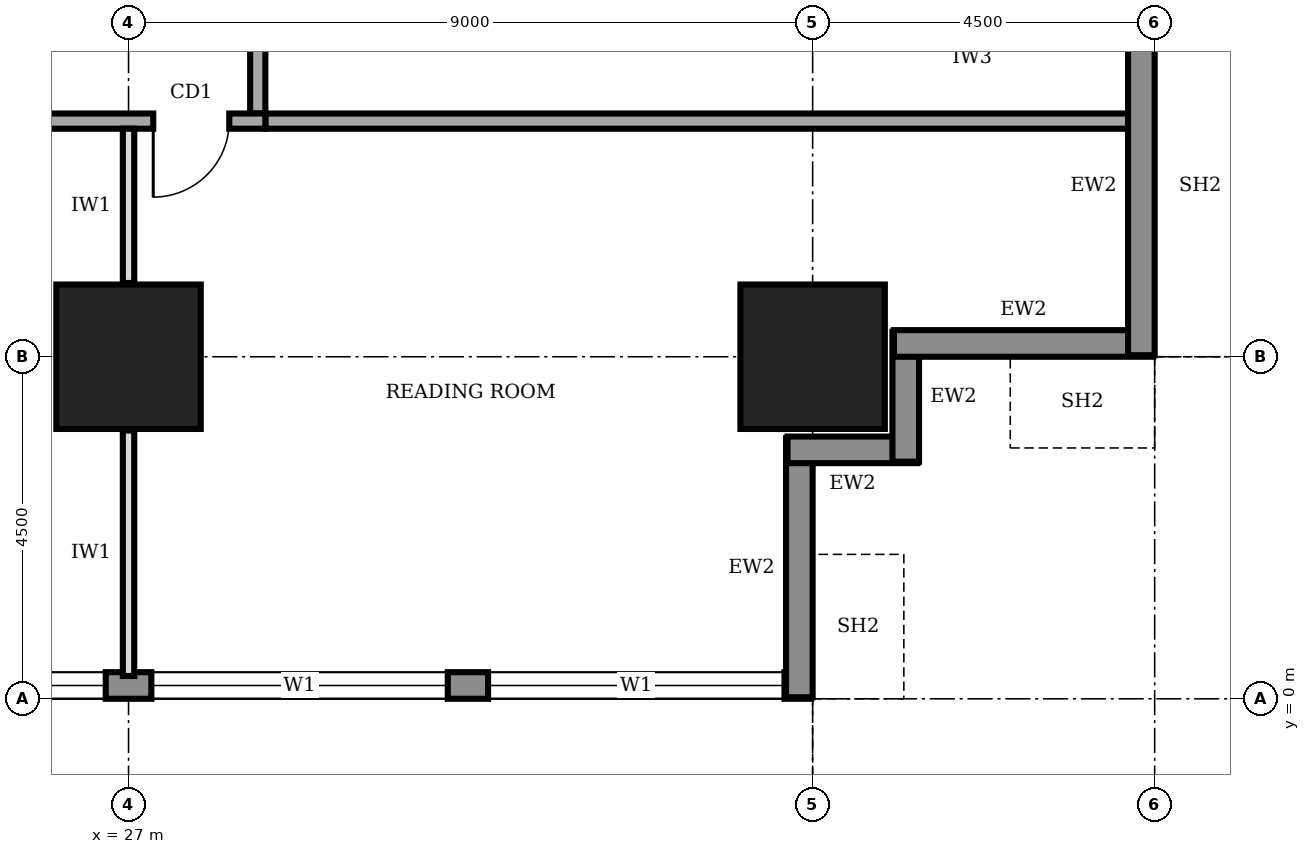
"""IFC4 building model, lengths in metres.
Left out: names, types, materials, properties, quantities, classifications, styles, units other than length and angle.
Written with IfcOpenShell. Run it as: python <this file> out.ifc"""

import sys

from ifc_helpers import new_model, si_unit, direction, frame, frame_2d, origin, origin_2d, place, context, subcontext, project, spatial, rectangle, extrude, element, fill, save


model = new_model("IFC4")
c1 = context("Model", 3, precision=1e-05, world=origin(), true_north=direction((0.0, 1.0)))
c2 = subcontext(c1, "Body", "Model", "MODEL_VIEW")
j1 = project(units=[si_unit("LENGTHUNIT", "METRE"), si_unit("PLANEANGLEUNIT", "RADIAN")], contexts=[c1])
p1 = place(None, origin())
s1 = spatial("IfcSite", under=j1, at=p1, CompositionType="ELEMENT")
p2 = place(p1, origin())
s2 = spatial("IfcBuilding", under=s1, at=p2, CompositionType="ELEMENT")
p3 = place(p2, frame((0.0, 0.0, 129.0)))
s3 = spatial("IfcBuildingStorey", under=s2, at=p3, CompositionType="ELEMENT", Elevation=129.0)
for number, where, z_axis, x_axis in (
    (1, (27.0, 4.5, 0.0), (0.0, 0.0, 1.0), (1.0, 0.0, 0.0)),
    (2, (36.0, 4.5, 0.0), (0.0, 0.0, 1.0), (1.0, 0.0, 0.0)),
):
    element("IfcColumn", number, at=place(p3, frame(where, z_axis=z_axis, x_axis=x_axis)), inside=s3, PredefinedType="COLUMN", context=c2, shape_type="SweptSolid", body=[
        extrude(rectangle(XDim=1.9, YDim=1.9, at=origin_2d()), origin(), (0.0, 0.0, 1.0), 4.0),
    ])
p4 = place(p3, frame((4.52, 0.175, 0.0), z_axis=(0.0, 0.0, 1.0), x_axis=(1.0, 0.0, 0.0)))
e3 = element("IfcWall", 3, at=p4, inside=s3, PredefinedType="STANDARD", context=c2, shape_type="SweptSolid", body=[
    extrude(rectangle(XDim=31.46, YDim=0.35, at=frame_2d((15.73, 0.0))), origin(), (0.0, 0.0, 1.0), 3.75),
])
p5 = place(p4, frame((4.78, 0.0, 0.9)))
e4 = element("IfcOpeningElement", 4, at=p5, cuts=e3, PredefinedType="OPENING", context=c2, shape_type="SweptSolid", body=[
    extrude(rectangle(XDim=3.9, YDim=2.2, at=frame_2d((1.95, 1.1))), frame((0.0, 0.185, 0.0), z_axis=(0.0, -1.0, 0.0), x_axis=(1.0, 0.0, 0.0)), (0.0, 0.0, 1.0), 0.37),
])
p6 = place(p4, frame((9.28, 0.0, 0.9)))
e5 = element("IfcOpeningElement", 5, at=p6, cuts=e3, PredefinedType="OPENING", context=c2, shape_type="SweptSolid", body=[
    extrude(rectangle(XDim=3.9, YDim=2.2, at=frame_2d((1.95, 1.1))), frame((0.0, 0.185, 0.0), z_axis=(0.0, -1.0, 0.0), x_axis=(1.0, 0.0, 0.0)), (0.0, 0.0, 1.0), 0.37),
])
p7 = place(p4, frame((13.78, 0.0, 0.9)))
e6 = element("IfcOpeningElement", 6, at=p7, cuts=e3, PredefinedType="OPENING", context=c2, shape_type="SweptSolid", body=[
    extrude(rectangle(XDim=3.9, YDim=2.2, at=frame_2d((1.95, 1.1))), frame((0.0, 0.185, 0.0), z_axis=(0.0, -1.0, 0.0), x_axis=(1.0, 0.0, 0.0)), (0.0, 0.0, 1.0), 0.37),
])
p8 = place(p4, frame((18.28, 0.0, 0.9)))
e7 = element("IfcOpeningElement", 7, at=p8, cuts=e3, PredefinedType="OPENING", context=c2, shape_type="SweptSolid", body=[
    extrude(rectangle(XDim=3.9, YDim=2.2, at=frame_2d((1.95, 1.1))), frame((0.0, 0.185, 0.0), z_axis=(0.0, -1.0, 0.0), x_axis=(1.0, 0.0, 0.0)), (0.0, 0.0, 1.0), 0.37),
])
p9 = place(p4, frame((22.78, 0.0, 0.9)))
e8 = element("IfcOpeningElement", 8, at=p9, cuts=e3, PredefinedType="OPENING", context=c2, shape_type="SweptSolid", body=[
    extrude(rectangle(XDim=3.9, YDim=2.2, at=frame_2d((1.95, 1.1))), frame((0.0, 0.185, 0.0), z_axis=(0.0, -1.0, 0.0), x_axis=(1.0, 0.0, 0.0)), (0.0, 0.0, 1.0), 0.37),
])
p10 = place(p4, frame((27.21, 0.0, 0.9)))
e9 = element("IfcOpeningElement", 9, at=p10, cuts=e3, PredefinedType="OPENING", context=c2, shape_type="SweptSolid", body=[
    extrude(rectangle(XDim=3.9, YDim=2.2, at=frame_2d((1.95, 1.1))), frame((0.0, 0.185, 0.0), z_axis=(0.0, -1.0, 0.0), x_axis=(1.0, 0.0, 0.0)), (0.0, 0.0, 1.0), 0.37),
])
p11 = place(p3, frame((35.825, 0.02, 0.0), z_axis=(0.0, 0.0, 1.0), x_axis=(0.0, 1.0, 0.0)))
e10 = element("IfcWall", 10, at=p11, inside=s3, PredefinedType="STANDARD", context=c2, shape_type="SweptSolid", body=[
    extrude(rectangle(XDim=3.41, YDim=0.35, at=frame_2d((1.705, 0.0))), origin(), (0.0, 0.0, 1.0), 2.85),
])
for number, where, z_axis, x_axis in (
    (11, (35.67, 3.275, 0.0), (0.0, 0.0, 1.0), (1.0, 0.0, 0.0)),
    (12, (37.225, 3.12, 0.0), (0.0, 0.0, 1.0), (0.0, 1.0, 0.0)),
):
    element("IfcWall", number, at=place(p3, frame(where, z_axis=z_axis, x_axis=x_axis)), inside=s3, PredefinedType="STANDARD", context=c2, shape_type="SweptSolid", body=[
        extrude(rectangle(XDim=1.71, YDim=0.35, at=frame_2d((0.855, 0.0))), origin(), (0.0, 0.0, 1.0), 3.75),
    ])
p12 = place(p3, frame((37.07, 4.675, 0.0), z_axis=(0.0, 0.0, 1.0), x_axis=(1.0, 0.0, 0.0)))
e13 = element("IfcWall", 13, at=p12, inside=s3, PredefinedType="STANDARD", context=c2, shape_type="SweptSolid", body=[
    extrude(rectangle(XDim=3.41, YDim=0.35, at=frame_2d((1.705, 0.0))), origin(), (0.0, 0.0, 1.0), 2.85),
])
p13 = place(p3, frame((40.325, 4.52, 0.0), z_axis=(0.0, 0.0, 1.0), x_axis=(0.0, 1.0, 0.0)))
e14 = element("IfcWall", 14, at=p13, inside=s3, PredefinedType="STANDARD", context=c2, shape_type="SweptSolid", body=[
    extrude(rectangle(XDim=4.46, YDim=0.35, at=frame_2d((2.23, 0.0))), origin(), (0.0, 0.0, 1.0), 3.75),
])
p14 = place(p3, frame((11.9, 7.6, 0.0), z_axis=(0.0, 0.0, 1.0), x_axis=(1.0, 0.0, 0.0)))
e15 = element("IfcWall", 15, at=p14, inside=s3, PredefinedType="SOLIDWALL", context=c2, shape_type="SweptSolid", body=[
    extrude(rectangle(XDim=16.9, YDim=0.2, at=frame_2d((8.45, 0.0))), origin(), (0.0, 0.0, 1.0), 3.75),
])
p15 = place(p14, frame((0.275, 0.0, 0.0)))
e16 = element("IfcOpeningElement", 16, at=p15, cuts=e15, PredefinedType="OPENING", context=c2, shape_type="SweptSolid", body=[
    extrude(rectangle(XDim=1.0, YDim=2.1, at=frame_2d((0.5, 1.05))), frame((0.0, 0.11, 0.0), z_axis=(0.0, -1.0, 0.0), x_axis=(1.0, 0.0, 0.0)), (0.0, 0.0, 1.0), 0.22),
])
p16 = place(p14, frame((3.35, 0.0, 0.0)))
e17 = element("IfcOpeningElement", 17, at=p16, cuts=e15, PredefinedType="OPENING", context=c2, shape_type="SweptSolid", body=[
    extrude(rectangle(XDim=1.0, YDim=2.1, at=frame_2d((0.5, 1.05))), frame((0.0, 0.11, 0.0), z_axis=(0.0, -1.0, 0.0), x_axis=(1.0, 0.0, 0.0)), (0.0, 0.0, 1.0), 0.22),
])
p17 = place(p14, frame((10.1, 0.0, 0.0)))
e18 = element("IfcOpeningElement", 18, at=p17, cuts=e15, PredefinedType="OPENING", context=c2, shape_type="SweptSolid", body=[
    extrude(rectangle(XDim=1.0, YDim=2.1, at=frame_2d((0.5, 1.05))), frame((0.0, 0.11, 0.0), z_axis=(0.0, -1.0, 0.0), x_axis=(1.0, 0.0, 0.0)), (0.0, 0.0, 1.0), 0.22),
])
p18 = place(p14, frame((15.425, 0.0, 0.0)))
e19 = element("IfcOpeningElement", 19, at=p18, cuts=e15, PredefinedType="OPENING", context=c2, shape_type="SweptSolid", body=[
    extrude(rectangle(XDim=1.0, YDim=2.1, at=frame_2d((0.5, 1.05))), frame((0.0, 0.11, 0.0), z_axis=(0.0, -1.0, 0.0), x_axis=(1.0, 0.0, 0.0)), (0.0, 0.0, 1.0), 0.22),
])
p19 = place(p3, frame((28.7, 7.7, 0.0), z_axis=(0.0, 0.0, 1.0), x_axis=(0.0, 1.0, 0.0)))
e20 = element("IfcWall", 20, at=p19, inside=s3, PredefinedType="SOLIDWALL", context=c2, shape_type="SweptSolid", body=[
    extrude(rectangle(XDim=23.8, YDim=0.2, at=frame_2d((11.9, 0.0))), origin(), (0.0, 0.0, 1.0), 3.75),
])
p20 = place(p19, frame((10.9, 0.0, 0.0)))
e21 = element("IfcOpeningElement", 21, at=p20, cuts=e20, PredefinedType="OPENING", context=c2, shape_type="SweptSolid", body=[
    extrude(rectangle(XDim=1.8, YDim=2.1, at=frame_2d((0.9, 1.05))), frame((0.0, 0.11, 0.0), z_axis=(0.0, -1.0, 0.0), x_axis=(1.0, 0.0, 0.0)), (0.0, 0.0, 1.0), 0.22),
])
p21 = place(p3, frame((28.8, 7.6, 0.0), z_axis=(0.0, 0.0, 1.0), x_axis=(1.0, 0.0, 0.0)))
e22 = element("IfcWall", 22, at=p21, inside=s3, PredefinedType="SOLIDWALL", context=c2, shape_type="SweptSolid", body=[
    extrude(rectangle(XDim=11.4, YDim=0.2, at=frame_2d((5.7, 0.0))), origin(), (0.0, 0.0, 1.0), 3.75),
])
p22 = place(p3, frame((27.0, 0.3, 0.0), z_axis=(0.0, 0.0, 1.0), x_axis=(0.0, 1.0, 0.0)))
e23 = element("IfcWall", 23, at=p22, inside=s3, PredefinedType="PARTITIONING", context=c2, shape_type="SweptSolid", body=[
    extrude(rectangle(XDim=3.23, YDim=0.15, at=frame_2d((1.615, 0.0))), origin(), (0.0, 0.0, 1.0), 2.85),
])
p23 = place(p3, frame((27.0, 5.47, 0.0), z_axis=(0.0, 0.0, 1.0), x_axis=(0.0, 1.0, 0.0)))
e24 = element("IfcWall", 24, at=p23, inside=s3, PredefinedType="PARTITIONING", context=c2, shape_type="SweptSolid", body=[
    extrude(rectangle(XDim=2.03, YDim=0.15, at=frame_2d((1.015, 0.0))), origin(), (0.0, 0.0, 1.0), 2.85),
])
p24 = place(p8, origin())
e25 = element("IfcWindow", 25, at=p24, inside=s3, PartitioningType="SINGLE_PANEL", PredefinedType="WINDOW", context=c2, shape_type="SweptSolid", body=[
    extrude(rectangle(XDim=3.9, YDim=2.2, at=frame_2d((1.95, 1.1))), frame((0.0, 0.03, 0.0), z_axis=(0.0, -1.0, 0.0), x_axis=(1.0, 0.0, 0.0)), (0.0, 0.0, 1.0), 0.06),
])
fill(e7, e25)
p25 = place(p9, origin())
e26 = element("IfcWindow", 26, at=p25, inside=s3, PartitioningType="SINGLE_PANEL", PredefinedType="WINDOW", context=c2, shape_type="SweptSolid", body=[
    extrude(rectangle(XDim=3.9, YDim=2.2, at=frame_2d((1.95, 1.1))), frame((0.0, 0.03, 0.0), z_axis=(0.0, -1.0, 0.0), x_axis=(1.0, 0.0, 0.0)), (0.0, 0.0, 1.0), 0.06),
])
fill(e8, e26)
p26 = place(p10, origin())
e27 = element("IfcWindow", 27, at=p26, inside=s3, PartitioningType="SINGLE_PANEL", PredefinedType="WINDOW", context=c2, shape_type="SweptSolid", body=[
    extrude(rectangle(XDim=3.9, YDim=2.2, at=frame_2d((1.95, 1.1))), frame((0.0, 0.03, 0.0), z_axis=(0.0, -1.0, 0.0), x_axis=(1.0, 0.0, 0.0)), (0.0, 0.0, 1.0), 0.06),
])
fill(e9, e27)
p27 = place(p18, frame((1.0, 0.0, 0.0), z_axis=(0.0, 0.0, 1.0), x_axis=(-1.0, 0.0, 0.0)))
e28 = element("IfcDoor", 28, at=p27, inside=s3, OperationType="SINGLE_SWING_RIGHT", PredefinedType="DOOR", context=c2, shape_type="SweptSolid", body=[
    extrude(rectangle(XDim=1.0, YDim=2.1, at=frame_2d((0.5, 1.05))), frame((0.0, 0.025, 0.0), z_axis=(0.0, -1.0, 0.0), x_axis=(1.0, 0.0, 0.0)), (0.0, 0.0, 1.0), 0.05),
])
fill(e19, e28)
save(model, sys.argv[1])
